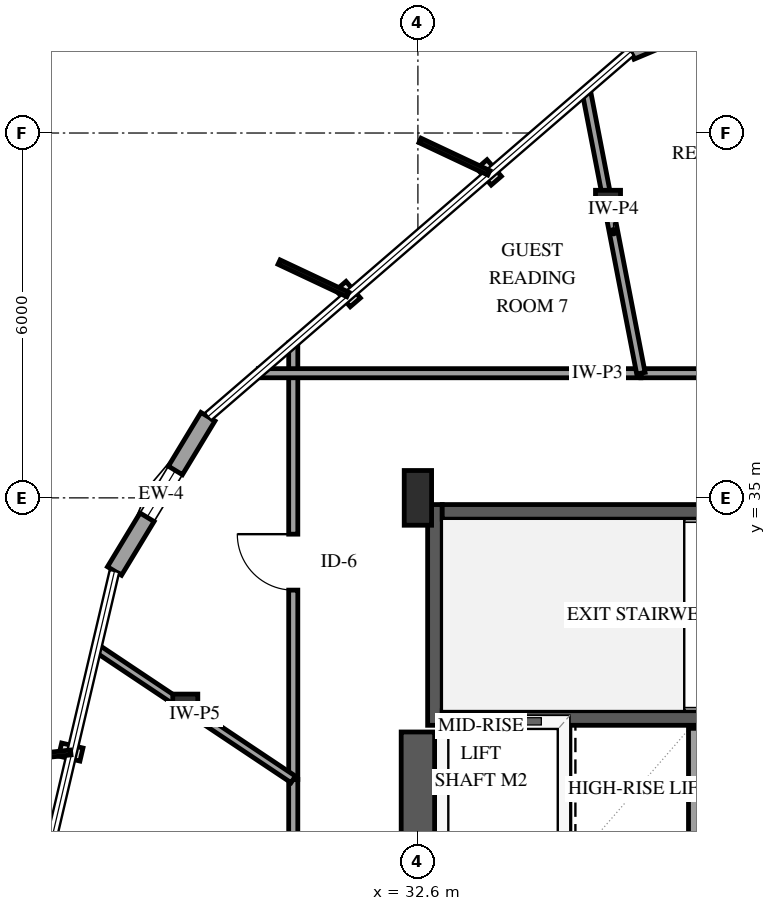
"""IFC4 building model, lengths in metres.
Left out: names, types, materials, properties, quantities, classifications, styles, units other than length and angle.
Written with IfcOpenShell. Run it as: python <this file> out.ifc"""

import sys

from ifc_helpers import new_model, si_unit, direction, frame, frame_2d, origin, origin_2d, place, context, subcontext, project, spatial, rectangle, i_section, extrude, element, fill, save


model = new_model("IFC4")
c1 = context("Model", 3, precision=1e-05, world=origin(), true_north=direction((0.0, 1.0)))
c2 = subcontext(c1, "Body", "Model", "MODEL_VIEW")
j1 = project(units=[si_unit("LENGTHUNIT", "METRE"), si_unit("PLANEANGLEUNIT", "RADIAN")], contexts=[c1])
p1 = place(None, origin())
s1 = spatial("IfcSite", under=j1, at=p1, CompositionType="ELEMENT")
p2 = place(p1, origin())
s2 = spatial("IfcBuilding", under=s1, at=p2, CompositionType="ELEMENT")
p3 = place(p2, frame((0.0, 0.0, 182.2)))
s3 = spatial("IfcBuildingStorey", under=s2, at=p3, CompositionType="ELEMENT", Elevation=182.2)
p4 = place(p3, frame((32.88, 31.26, 0.0), z_axis=(0.0, 0.0, 1.0), x_axis=(0.0, 1.0, 0.0)))
e1 = element("IfcWall", 1, at=p4, inside=s3, PredefinedType="SHEAR", context=c2, shape_type="SweptSolid", body=[
    extrude(rectangle(XDim=3.63, YDim=0.24, at=frame_2d((1.815, 0.0))), origin(), (0.0, 0.0, 1.0), 3.6),
])
for number, where, z_axis, x_axis in (
    (2, (33.0, 31.38, 0.0), (0.0, 0.0, 1.0), (1.0, 0.0, 0.0)),
    (3, (33.0, 34.77, 0.0), (0.0, 0.0, 1.0), (1.0, 0.0, 0.0)),
):
    element("IfcWall", number, at=place(p3, frame(where, z_axis=z_axis, x_axis=x_axis)), inside=s3, PredefinedType="SHEAR", context=c2, shape_type="SweptSolid", body=[
        extrude(rectangle(XDim=8.0, YDim=0.24, at=frame_2d((4.0, 0.0))), origin(), (0.0, 0.0, 1.0), 3.6),
    ])
p5 = place(p3, frame((32.6, 18.85, 0.0), z_axis=(0.0, 0.0, 1.0), x_axis=(0.0, 1.0, 0.0)))
e4 = element("IfcWall", 4, at=p5, inside=s3, PredefinedType="SHEAR", context=c2, shape_type="SweptSolid", body=[
    extrude(rectangle(XDim=12.3, YDim=0.55, at=frame_2d((6.15, 0.0))), origin(), (0.0, 0.0, 1.0), 3.6),
])
p6 = place(p3, frame((32.6, 35.0, 0.0), z_axis=(0.0, 0.0, 1.0), x_axis=(1.0, 0.0, 0.0)))
e5 = element("IfcColumn", 5, at=p6, inside=s3, PredefinedType="PILASTER", context=c2, shape_type="SweptSolid", body=[
    extrude(rectangle(XDim=0.45, YDim=0.9, at=origin_2d()), origin(), (0.0, 0.0, 1.0), 3.6),
])
for number, where, z_axis, x_axis in (
    (6, (35.726, 39.841, 0.0), (0.0, 0.0, 1.0), (1.0, 0.0, 0.0)),
    (7, (28.774, 31.556, 0.0), (0.0, 0.0, 1.0), (1.0, 0.0, 0.0)),
):
    element("IfcColumn", number, at=place(p3, frame(where, z_axis=z_axis, x_axis=x_axis)), inside=s3, PredefinedType="COLUMN", context=c2, shape_type="SweptSolid", body=[
        extrude(i_section(OverallWidth=0.412, OverallDepth=0.435, WebThickness=0.036, FlangeThickness=0.057, FilletRadius=0.038, at=origin_2d()), origin(), (0.0, 0.0, 1.0), 3.6),
    ])
p7 = place(p3, frame((38.837, 43.488, 0.0), z_axis=(0.0, 0.0, 1.0), x_axis=(-0.921859835558, -0.387523474883, 0.0)))
e8 = element("IfcWall", 8, at=p7, inside=s3, PredefinedType="SOLIDWALL", context=c2, shape_type="SweptSolid", body=[
    extrude(rectangle(XDim=2.967, YDim=0.27, at=frame_2d((1.483, 0.0))), origin(), (0.0, 0.0, 1.0), 2.639),
])
p8 = place(p7, frame((1.033, 0.0, 0.75)))
e9 = element("IfcOpeningElement", 9, at=p8, cuts=e8, PredefinedType="OPENING", context=c2, shape_type="SweptSolid", body=[
    extrude(rectangle(XDim=0.9, YDim=1.5, at=frame_2d((0.45, 0.75))), frame((0.0, 0.145, 0.0), z_axis=(0.0, -1.0, 0.0), x_axis=(1.0, 0.0, 0.0)), (0.0, 0.0, 1.0), 0.29),
])
p9 = place(p3, frame((29.147, 36.335, 0.0), z_axis=(0.0, 0.0, 1.0), x_axis=(-0.518037235883, -0.855358066683, 0.0)))
e10 = element("IfcWall", 10, at=p9, inside=s3, PredefinedType="SOLIDWALL", context=c2, shape_type="SweptSolid", body=[
    extrude(rectangle(XDim=2.967, YDim=0.27, at=frame_2d((1.483, 0.0))), origin(), (0.0, 0.0, 1.0), 2.639),
])
p10 = place(p9, frame((1.033, 0.0, 0.75)))
e11 = element("IfcOpeningElement", 11, at=p10, cuts=e10, PredefinedType="OPENING", context=c2, shape_type="SweptSolid", body=[
    extrude(rectangle(XDim=0.9, YDim=1.5, at=frame_2d((0.45, 0.75))), frame((0.0, 0.145, 0.0), z_axis=(0.0, -1.0, 0.0), x_axis=(1.0, 0.0, 0.0)), (0.0, 0.0, 1.0), 0.29),
])
for number, where, z_axis, x_axis in (
    (12, (35.0, 29.11, 0.0), (0.0, 0.0, 1.0), (0.0, 1.0, 0.0)),
    (13, (37.15, 29.11, 0.0), (0.0, 0.0, 1.0), (0.0, 1.0, 0.0)),
):
    element("IfcWall", number, at=place(p3, frame(where, z_axis=z_axis, x_axis=x_axis)), inside=s3, PredefinedType="SOLIDWALL", context=c2, shape_type="SweptSolid", body=[
        extrude(rectangle(XDim=2.1, YDim=0.2, at=frame_2d((1.05, 0.0))), origin(), (0.0, 0.0, 1.0), 3.26),
    ])
p11 = place(p3, frame((30.55, 11.78, 0.0), z_axis=(0.0, 0.0, 1.0), x_axis=(0.0, 1.0, 0.0)))
e14 = element("IfcWall", 14, at=p11, inside=s3, PredefinedType="PARTITIONING", context=c2, shape_type="SweptSolid", body=[
    extrude(rectangle(XDim=18.59, YDim=0.15, at=frame_2d((9.295, 0.0))), origin(), (0.0, 0.0, 1.0), 3.26),
])
p12 = place(p11, frame((8.82, 0.0, 0.0)))
e15 = element("IfcOpeningElement", 15, at=p12, cuts=e14, PredefinedType="OPENING", context=c2, shape_type="SweptSolid", body=[
    extrude(rectangle(XDim=0.92, YDim=2.12, at=frame_2d((0.46, 1.06))), frame((0.0, 0.085, 0.0), z_axis=(0.0, -1.0, 0.0), x_axis=(1.0, 0.0, 0.0)), (0.0, 0.0, 1.0), 0.17),
])
p13 = place(p3, frame((30.55, 30.37, 0.0), z_axis=(0.0, 0.0, 1.0), x_axis=(0.0, 1.0, 0.0)))
e16 = element("IfcWall", 16, at=p13, inside=s3, PredefinedType="PARTITIONING", context=c2, shape_type="SweptSolid", body=[
    extrude(rectangle(XDim=7.176, YDim=0.15, at=frame_2d((3.588, 0.0))), origin(), (0.0, 0.0, 1.0), 3.26),
])
p14 = place(p13, frame((3.113, 0.0, 0.0)))
e17 = element("IfcOpeningElement", 17, at=p14, cuts=e16, PredefinedType="OPENING", context=c2, shape_type="SweptSolid", body=[
    extrude(rectangle(XDim=0.92, YDim=2.12, at=frame_2d((0.46, 1.06))), frame((0.0, 0.085, 0.0), z_axis=(0.0, -1.0, 0.0), x_axis=(1.0, 0.0, 0.0)), (0.0, 0.0, 1.0), 0.17),
])
p15 = place(p3, frame((29.976, 37.05, 0.0), z_axis=(0.0, 0.0, 1.0), x_axis=(1.0, 0.0, 0.0)))
e18 = element("IfcWall", 18, at=p15, inside=s3, PredefinedType="PARTITIONING", context=c2, shape_type="SweptSolid", body=[
    extrude(rectangle(XDim=6.291, YDim=0.15, at=frame_2d((3.146, 0.0))), origin(), (0.0, 0.0, 1.0), 3.26),
])
p16 = place(p3, frame((36.267, 37.05, 0.0), z_axis=(0.0, 0.0, 1.0), x_axis=(1.0, 0.0, 0.0)))
e19 = element("IfcWall", 19, at=p16, inside=s3, PredefinedType="PARTITIONING", context=c2, shape_type="SweptSolid", body=[
    extrude(rectangle(XDim=4.863, YDim=0.15, at=frame_2d((2.431, 0.0))), origin(), (0.0, 0.0, 1.0), 3.26),
])
p17 = place(p3, frame((36.267, 37.05, 0.0), z_axis=(0.0, 0.0, 1.0), x_axis=(-0.190138832586, 0.981757212524, 0.0)))
e20 = element("IfcWall", 20, at=p17, inside=s3, PredefinedType="PARTITIONING", context=c2, shape_type="SweptSolid", body=[
    extrude(rectangle(XDim=4.739, YDim=0.14, at=frame_2d((2.37, 0.0))), origin(), (0.0, 0.0, 1.0), 2.555),
])
p18 = place(p3, frame((30.55, 30.37, 0.0), z_axis=(0.0, 0.0, 1.0), x_axis=(-0.83171237319, 0.555206743729, 0.0)))
e21 = element("IfcWall", 21, at=p18, inside=s3, PredefinedType="PARTITIONING", context=c2, shape_type="SweptSolid", body=[
    extrude(rectangle(XDim=3.892, YDim=0.13, at=frame_2d((1.946, 0.0))), origin(), (0.0, 0.0, 1.0), 3.26),
])
p19 = place(p10, origin())
e22 = element("IfcWindow", 22, at=p19, inside=s3, PartitioningType="SINGLE_PANEL", PredefinedType="WINDOW", context=c2, shape_type="SweptSolid", body=[
    extrude(rectangle(XDim=0.9, YDim=1.5, at=frame_2d((0.45, 0.75))), frame((0.0, 0.03, 0.0), z_axis=(0.0, -1.0, 0.0), x_axis=(1.0, 0.0, 0.0)), (0.0, 0.0, 1.0), 0.06),
])
fill(e11, e22)
p20 = place(p14, origin())
e23 = element("IfcDoor", 23, at=p20, inside=s3, OperationType="SINGLE_SWING_RIGHT", PredefinedType="DOOR", context=c2, shape_type="SweptSolid", body=[
    extrude(rectangle(XDim=0.92, YDim=2.12, at=frame_2d((0.46, 1.06))), frame((0.0, 0.025, 0.0), z_axis=(0.0, -1.0, 0.0), x_axis=(1.0, 0.0, 0.0)), (0.0, 0.0, 1.0), 0.05),
])
fill(e17, e23)
save(model, sys.argv[1])
